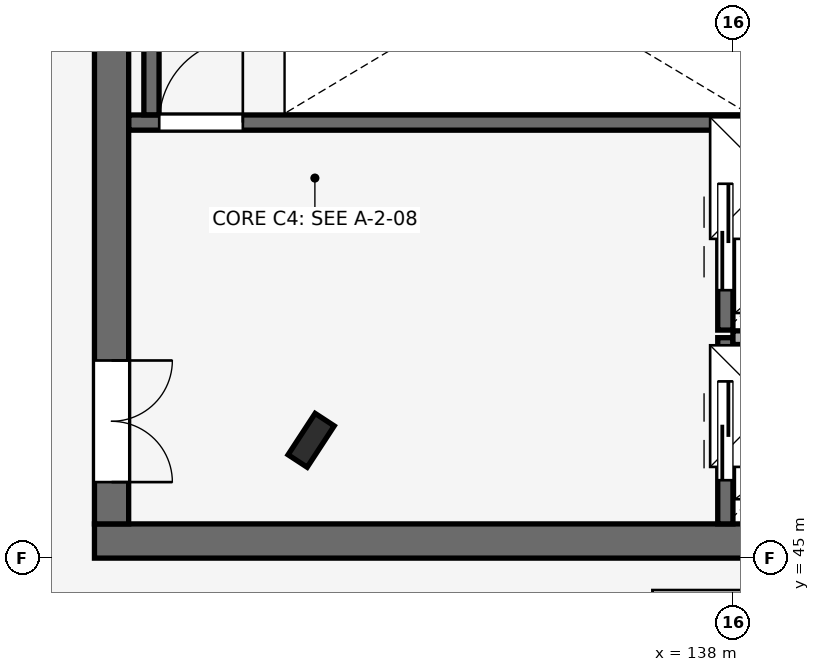
"""IFC4 building model, lengths in metres.
Left out: names, types, materials, properties, quantities, classifications, styles, units other than length and angle.
Written with IfcOpenShell. Run it as: python <this file> out.ifc"""

import sys

from ifc_helpers import new_model, si_unit, direction, frame, frame_2d, origin, origin_2d, place, context, subcontext, project, spatial, rectangle, i_section, extrude, element, fill, save


model = new_model("IFC4")
c1 = context("Model", 3, precision=1e-05, world=origin(), true_north=direction((0.0, 1.0)))
c2 = subcontext(c1, "Body", "Model", "MODEL_VIEW")
j1 = project(units=[si_unit("LENGTHUNIT", "METRE"), si_unit("PLANEANGLEUNIT", "RADIAN")], contexts=[c1])
p1 = place(None, origin())
s1 = spatial("IfcSite", under=j1, at=p1, CompositionType="ELEMENT")
p2 = place(p1, origin())
s2 = spatial("IfcBuilding", under=s1, at=p2, CompositionType="ELEMENT")
p3 = place(p2, frame((0.0, 0.0, 24.0)))
s3 = spatial("IfcBuildingStorey", under=s2, at=p3, CompositionType="ELEMENT", Elevation=24.0)
p4 = place(p3, frame((132.451, 46.55, 0.0), z_axis=(0.0, 0.0, 1.0), x_axis=(0.836955398099, -0.547271104292, 0.0)))
e1 = element("IfcColumn", 1, at=p4, inside=s3, PredefinedType="COLUMN", context=c2, shape_type="SweptSolid", body=[
    extrude(i_section(OverallWidth=0.3, OverallDepth=0.65, WebThickness=0.016, FlangeThickness=0.031, FilletRadius=0.027, at=origin_2d()), origin(), (0.0, 0.0, 1.0), 3.4),
])
p5 = place(p3, frame((129.6, 45.225, 0.0), z_axis=(0.0, 0.0, 1.0), x_axis=(1.0, 0.0, 0.0)))
e2 = element("IfcWall", 2, at=p5, inside=s3, PredefinedType="SHEAR", context=c2, shape_type="SweptSolid", body=[
    extrude(rectangle(XDim=11.4, YDim=0.45, at=frame_2d((5.7, 0.0))), origin(), (0.0, 0.0, 1.0), 4.8),
])
p6 = place(p3, frame((129.825, 45.45, 0.0), z_axis=(0.0, 0.0, 1.0), x_axis=(0.0, 1.0, 0.0)))
e3 = element("IfcWall", 3, at=p6, inside=s3, PredefinedType="SHEAR", context=c2, shape_type="SweptSolid", body=[
    extrude(rectangle(XDim=9.1, YDim=0.45, at=frame_2d((4.55, 0.0))), origin(), (0.0, 0.0, 1.0), 4.8),
])
p7 = place(p6, frame((0.55, 0.0, 0.0)))
e4 = element("IfcOpeningElement", 4, at=p7, cuts=e3, PredefinedType="OPENING", context=c2, shape_type="SweptSolid", body=[
    extrude(rectangle(XDim=1.6, YDim=2.2, at=frame_2d((0.8, 1.1))), frame((0.0, 0.235, 0.0), z_axis=(0.0, -1.0, 0.0), x_axis=(1.0, 0.0, 0.0)), (0.0, 0.0, 1.0), 0.47),
])
p8 = place(p3, frame((137.9, 45.45, 0.0), z_axis=(0.0, 0.0, 1.0), x_axis=(0.0, 1.0, 0.0)))
e5 = element("IfcWall", 5, at=p8, inside=s3, PredefinedType="SHEAR", context=c2, shape_type="SweptSolid", body=[
    extrude(rectangle(XDim=2.45, YDim=0.2, at=frame_2d((1.225, 0.0))), origin(), (0.0, 0.0, 1.0), 3.38),
])
p9 = place(p8, frame((0.575, 0.0, 0.0)))
e6 = element("IfcOpeningElement", 6, at=p9, cuts=e5, PredefinedType="OPENING", context=c2, shape_type="SweptSolid", body=[
    extrude(rectangle(XDim=1.3, YDim=2.2, at=frame_2d((0.65, 1.1))), frame((0.0, 0.11, 0.0), z_axis=(0.0, -1.0, 0.0), x_axis=(1.0, 0.0, 0.0)), (0.0, 0.0, 1.0), 0.22),
])
p10 = place(p3, frame((138.0, 47.9, 0.0), z_axis=(0.0, 0.0, 1.0), x_axis=(1.0, 0.0, 0.0)))
e7 = element("IfcWall", 7, at=p10, inside=s3, PredefinedType="PARTITIONING", context=c2, shape_type="SweptSolid", body=[
    extrude(rectangle(XDim=2.45, YDim=0.18, at=frame_2d((1.225, 0.0))), origin(), (0.0, 0.0, 1.0), 4.8),
])
p11 = place(p3, frame((137.9, 48.0, 0.0), z_axis=(0.0, 0.0, 1.0), x_axis=(0.0, 1.0, 0.0)))
e8 = element("IfcWall", 8, at=p11, inside=s3, PredefinedType="SHEAR", context=c2, shape_type="SweptSolid", body=[
    extrude(rectangle(XDim=2.45, YDim=0.2, at=frame_2d((1.225, 0.0))), origin(), (0.0, 0.0, 1.0), 3.38),
])
p12 = place(p11, frame((0.525, 0.0, 0.0)))
e9 = element("IfcOpeningElement", 9, at=p12, cuts=e8, PredefinedType="OPENING", context=c2, shape_type="SweptSolid", body=[
    extrude(rectangle(XDim=1.4, YDim=2.2, at=frame_2d((0.7, 1.1))), frame((0.0, 0.11, 0.0), z_axis=(0.0, -1.0, 0.0), x_axis=(1.0, 0.0, 0.0)), (0.0, 0.0, 1.0), 0.22),
])
p13 = place(p3, frame((138.0, 50.45, 0.0), z_axis=(0.0, 0.0, 1.0), x_axis=(1.0, 0.0, 0.0)))
e10 = element("IfcWall", 10, at=p13, inside=s3, PredefinedType="PARTITIONING", context=c2, shape_type="SweptSolid", body=[
    extrude(rectangle(XDim=2.45, YDim=0.18, at=frame_2d((1.225, 0.0))), origin(), (0.0, 0.0, 1.0), 4.8),
])
p14 = place(p3, frame((130.052, 50.73, 0.0), z_axis=(0.0, 0.0, 1.0), x_axis=(1.0, 0.0, 0.0)))
e11 = element("IfcWall", 11, at=p14, inside=s3, PredefinedType="SHEAR", context=c2, shape_type="SweptSolid", body=[
    extrude(rectangle(XDim=8.248, YDim=0.2, at=frame_2d((4.124, 0.0))), origin(), (0.0, 0.0, 1.0), 4.8),
])
p15 = place(p14, frame((0.4, 0.0, 0.0)))
e12 = element("IfcOpeningElement", 12, at=p15, cuts=e11, PredefinedType="OPENING", context=c2, shape_type="SweptSolid", body=[
    extrude(rectangle(XDim=1.1, YDim=2.15, at=frame_2d((0.55, 1.075))), frame((0.0, 0.11, 0.0), z_axis=(0.0, -1.0, 0.0), x_axis=(1.0, 0.0, 0.0)), (0.0, 0.0, 1.0), 0.22),
])
p16 = place(p3, frame((130.35, 50.832, 0.0), z_axis=(0.0, 0.0, 1.0), x_axis=(0.0, 1.0, 0.0)))
e13 = element("IfcWall", 13, at=p16, inside=s3, PredefinedType="SHEAR", context=c2, shape_type="SweptSolid", body=[
    extrude(rectangle(XDim=3.686, YDim=0.2, at=frame_2d((1.843, 0.0))), origin(), (0.0, 0.0, 1.0), 4.8),
])
p17 = place(p2, frame((0.0, 0.0, 28.8)))
p18 = place(p17, frame((138.44, 50.445, 0.0)))
p19 = place(p18, frame((0.06, -3.445, -0.01)))
p20 = place(p19, frame((0.0, 0.0, 0.14)))
e14 = element("IfcWindow", 14, at=p20, inside=s3, PartitioningType="SINGLE_PANEL", PredefinedType="SKYLIGHT", context=c2, shape_type="SweptSolid", body=[
    extrude(rectangle(XDim=1.6, YDim=1.6, at=origin_2d()), origin(), (0.0, 0.0, 1.0), 0.05),
])
p21 = place(p18, frame((0.06, -0.445, -0.01)))
p22 = place(p21, frame((0.0, 0.0, 0.14)))
e15 = element("IfcWindow", 15, at=p22, inside=s3, PartitioningType="SINGLE_PANEL", PredefinedType="SKYLIGHT", context=c2, shape_type="SweptSolid", body=[
    extrude(rectangle(XDim=1.6, YDim=1.6, at=origin_2d()), origin(), (0.0, 0.0, 1.0), 0.05),
])
p23 = place(p9, origin())
e16 = element("IfcDoor", 16, at=p23, inside=s3, OperationType="DOUBLE_DOOR_SLIDING", PredefinedType="DOOR", context=c2, shape_type="SweptSolid", body=[
    extrude(rectangle(XDim=1.3, YDim=2.2, at=frame_2d((0.65, 1.1))), frame((0.0, 0.025, 0.0), z_axis=(0.0, -1.0, 0.0), x_axis=(1.0, 0.0, 0.0)), (0.0, 0.0, 1.0), 0.05),
])
fill(e6, e16)
p24 = place(p12, origin())
e17 = element("IfcDoor", 17, at=p24, inside=s3, OperationType="DOUBLE_DOOR_SLIDING", PredefinedType="DOOR", context=c2, shape_type="SweptSolid", body=[
    extrude(rectangle(XDim=1.4, YDim=2.2, at=frame_2d((0.7, 1.1))), frame((0.0, 0.025, 0.0), z_axis=(0.0, -1.0, 0.0), x_axis=(1.0, 0.0, 0.0)), (0.0, 0.0, 1.0), 0.05),
])
fill(e9, e17)
p25 = place(p15, frame((1.1, 0.0, 0.0), z_axis=(0.0, 0.0, 1.0), x_axis=(-1.0, 0.0, 0.0)))
e18 = element("IfcDoor", 18, at=p25, inside=s3, OperationType="SINGLE_SWING_LEFT", PredefinedType="DOOR", context=c2, shape_type="SweptSolid", body=[
    extrude(rectangle(XDim=1.1, YDim=2.15, at=frame_2d((0.55, 1.075))), frame((0.0, 0.025, 0.0), z_axis=(0.0, -1.0, 0.0), x_axis=(1.0, 0.0, 0.0)), (0.0, 0.0, 1.0), 0.05),
])
fill(e12, e18)
p26 = place(p7, frame((1.6, 0.0, 0.0), z_axis=(0.0, 0.0, 1.0), x_axis=(-1.0, 0.0, 0.0)))
e19 = element("IfcDoor", 19, at=p26, inside=s3, OperationType="DOUBLE_DOOR_SINGLE_SWING", PredefinedType="DOOR", context=c2, shape_type="SweptSolid", body=[
    extrude(rectangle(XDim=1.6, YDim=2.2, at=frame_2d((0.8, 1.1))), frame((0.0, 0.025, 0.0), z_axis=(0.0, -1.0, 0.0), x_axis=(1.0, 0.0, 0.0)), (0.0, 0.0, 1.0), 0.05),
])
fill(e4, e19)
save(model, sys.argv[1])
